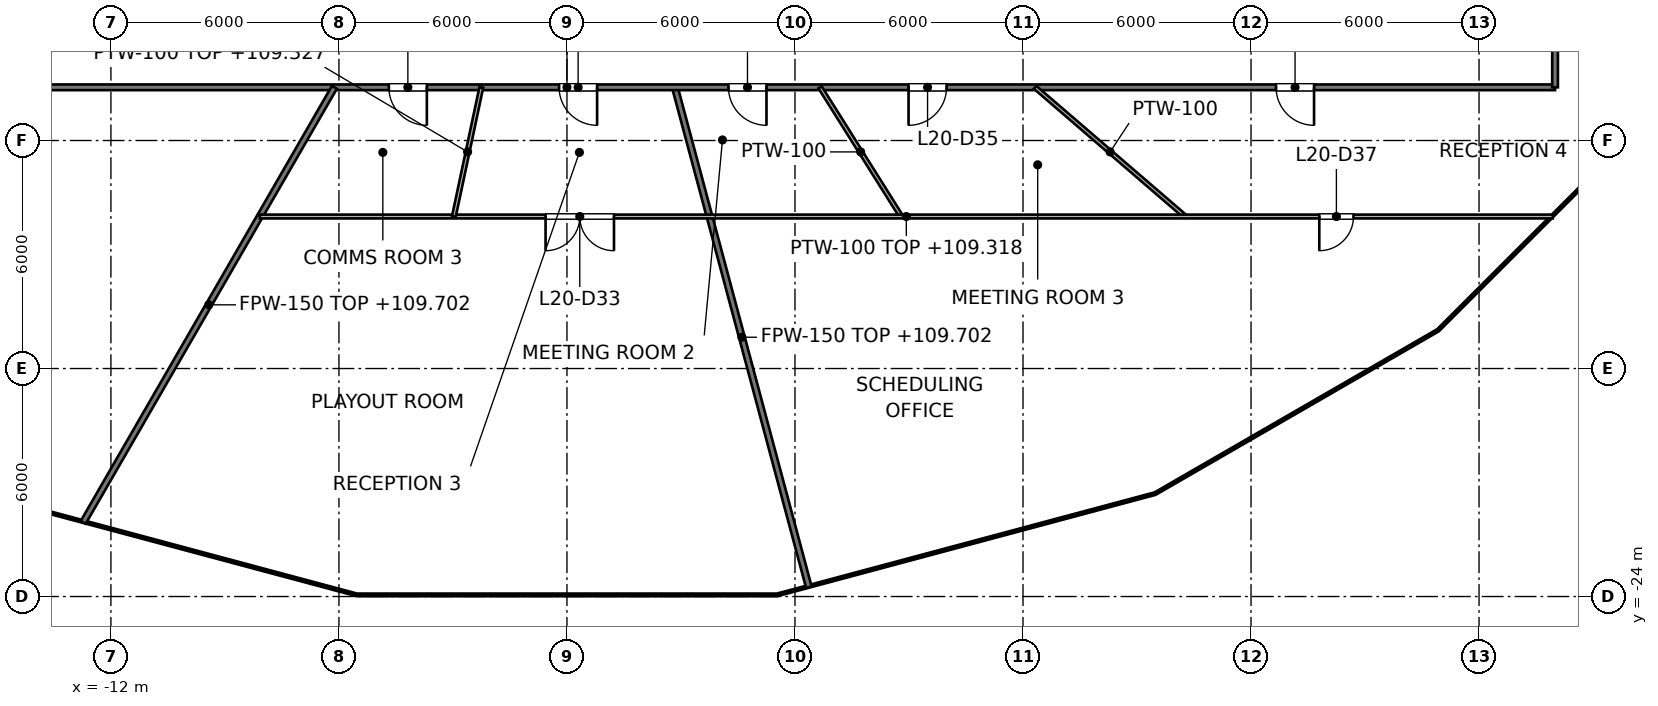
"""IFC4 building model, lengths in metres.
Left out: names, types, materials, properties, quantities, classifications, styles, units other than length and angle.
Written with IfcOpenShell. Run it as: python <this file> out.ifc"""

import sys

from ifc_helpers import new_model, si_unit, direction, frame, frame_2d, origin, place, context, subcontext, project, spatial, rectangle, extrude, element, fill, save


model = new_model("IFC4")
c1 = context("Model", 3, precision=1e-05, world=origin(), true_north=direction((0.0, 1.0)))
c2 = subcontext(c1, "Body", "Model", "MODEL_VIEW")
j1 = project(units=[si_unit("LENGTHUNIT", "METRE"), si_unit("PLANEANGLEUNIT", "RADIAN")], contexts=[c1])
p1 = place(None, origin())
s1 = spatial("IfcSite", under=j1, at=p1, CompositionType="ELEMENT")
p2 = place(p1, origin())
s2 = spatial("IfcBuilding", under=s1, at=p2, CompositionType="ELEMENT")
p3 = place(p2, frame((0.0, 0.0, 106.2)))
s3 = spatial("IfcBuildingStorey", under=s2, at=p3, CompositionType="ELEMENT", Elevation=106.2)
p4 = place(p3, frame((2.84, -10.6, 0.0), z_axis=(0.0, 0.0, 1.0), x_axis=(0.258826294763, -0.965923883719, 0.0)))
e1 = element("IfcWall", 1, at=p4, inside=s3, PredefinedType="PARTITIONING", context=c2, shape_type="SweptSolid", body=[
    extrude(rectangle(XDim=13.618, YDim=0.15, at=frame_2d((6.809, 0.0))), origin(), (0.0, 0.0, 1.0), 3.502),
])
p5 = place(p3, frame((-26.0, -10.6, 0.0), z_axis=(0.0, 0.0, 1.0), x_axis=(1.0, 0.0, 0.0)))
e2 = element("IfcWall", 2, at=p5, inside=s3, PredefinedType="PARTITIONING", context=c2, shape_type="SweptSolid", body=[
    extrude(rectangle(XDim=52.0, YDim=0.15, at=frame_2d((26.0, 0.0))), origin(), (0.0, 0.0, 1.0), 3.118),
])
p6 = place(p5, frame((9.34, 0.0, 0.0)))
e3 = element("IfcOpeningElement", 3, at=p6, cuts=e2, PredefinedType="OPENING", context=c2, shape_type="SweptSolid", body=[
    extrude(rectangle(XDim=1.2, YDim=2.1, at=frame_2d((0.6, 1.05))), frame((0.0, 0.075, 0.0), z_axis=(0.0, -1.0, 0.0), x_axis=(1.0, 0.0, 0.0)), (0.0, 0.0, 1.0), 0.15),
])
p7 = place(p5, frame((21.313, 0.0, 0.0)))
e4 = element("IfcOpeningElement", 4, at=p7, cuts=e2, PredefinedType="OPENING", context=c2, shape_type="SweptSolid", body=[
    extrude(rectangle(XDim=1.0, YDim=2.1, at=frame_2d((0.5, 1.05))), frame((0.0, 0.075, 0.0), z_axis=(0.0, -1.0, 0.0), x_axis=(1.0, 0.0, 0.0)), (0.0, 0.0, 1.0), 0.15),
])
p8 = place(p5, frame((25.793, 0.0, 0.0)))
e5 = element("IfcOpeningElement", 5, at=p8, cuts=e2, PredefinedType="OPENING", context=c2, shape_type="SweptSolid", body=[
    extrude(rectangle(XDim=1.0, YDim=2.1, at=frame_2d((0.5, 1.05))), frame((0.0, 0.075, 0.0), z_axis=(0.0, -1.0, 0.0), x_axis=(1.0, 0.0, 0.0)), (0.0, 0.0, 1.0), 0.15),
])
p9 = place(p5, frame((30.25, 0.0, 0.0)))
e6 = element("IfcOpeningElement", 6, at=p9, cuts=e2, PredefinedType="OPENING", context=c2, shape_type="SweptSolid", body=[
    extrude(rectangle(XDim=1.0, YDim=2.1, at=frame_2d((0.5, 1.05))), frame((0.0, 0.075, 0.0), z_axis=(0.0, -1.0, 0.0), x_axis=(1.0, 0.0, 0.0)), (0.0, 0.0, 1.0), 0.15),
])
p10 = place(p5, frame((34.989, 0.0, 0.0)))
e7 = element("IfcOpeningElement", 7, at=p10, cuts=e2, PredefinedType="OPENING", context=c2, shape_type="SweptSolid", body=[
    extrude(rectangle(XDim=1.0, YDim=2.1, at=frame_2d((0.5, 1.05))), frame((0.0, 0.075, 0.0), z_axis=(0.0, -1.0, 0.0), x_axis=(1.0, 0.0, 0.0)), (0.0, 0.0, 1.0), 0.15),
])
p11 = place(p5, frame((44.658, 0.0, 0.0)))
e8 = element("IfcOpeningElement", 8, at=p11, cuts=e2, PredefinedType="OPENING", context=c2, shape_type="SweptSolid", body=[
    extrude(rectangle(XDim=1.0, YDim=2.1, at=frame_2d((0.5, 1.05))), frame((0.0, 0.075, 0.0), z_axis=(0.0, -1.0, 0.0), x_axis=(1.0, 0.0, 0.0)), (0.0, 0.0, 1.0), 0.15),
])
p12 = place(p3, frame((-12.729, -22.048, 0.0), z_axis=(0.0, 0.0, 1.0), x_axis=(0.499978786084, 0.866037651298, 0.0)))
e9 = element("IfcWall", 9, at=p12, inside=s3, PredefinedType="PARTITIONING", context=c2, shape_type="SweptSolid", body=[
    extrude(rectangle(XDim=13.219, YDim=0.15, at=frame_2d((6.609, 0.0))), origin(), (0.0, 0.0, 1.0), 3.502),
])
p13 = place(p3, frame((26.0, -10.6, 0.0), z_axis=(0.0, 0.0, 1.0), x_axis=(0.0, 1.0, 0.0)))
e10 = element("IfcWall", 10, at=p13, inside=s3, PredefinedType="PARTITIONING", context=c2, shape_type="SweptSolid", body=[
    extrude(rectangle(XDim=2.8, YDim=0.15, at=frame_2d((1.4, 0.0))), origin(), (0.0, 0.0, 1.0), 3.276),
])
p14 = place(p3, frame((6.66, -10.6, 0.0), z_axis=(0.0, 0.0, 1.0), x_axis=(0.532193956065, -0.846622461979, 0.0)))
e11 = element("IfcWall", 11, at=p14, inside=s3, PredefinedType="PARTITIONING", context=c2, shape_type="SweptSolid", body=[
    extrude(rectangle(XDim=4.016, YDim=0.1, at=frame_2d((2.008, 0.0))), origin(), (0.0, 0.0, 1.0), 4.05),
])
p15 = place(p3, frame((12.317, -10.6, 0.0), z_axis=(0.0, 0.0, 1.0), x_axis=(0.758005488553, -0.652248173109, 0.0)))
e12 = element("IfcWall", 12, at=p15, inside=s3, PredefinedType="PARTITIONING", context=c2, shape_type="SweptSolid", body=[
    extrude(rectangle(XDim=5.213, YDim=0.1, at=frame_2d((2.606, 0.0))), origin(), (0.0, 0.0, 1.0), 4.05),
])
p16 = place(p3, frame((-8.083, -14.0, 0.0), z_axis=(0.0, 0.0, 1.0), x_axis=(1.0, 0.0, 0.0)))
e13 = element("IfcWall", 13, at=p16, inside=s3, PredefinedType="PARTITIONING", context=c2, shape_type="SweptSolid", body=[
    extrude(rectangle(XDim=34.024, YDim=0.1, at=frame_2d((17.012, 0.0))), origin(), (0.0, 0.0, 1.0), 3.118),
])
p17 = place(p16, frame((7.52, 0.0, 0.0)))
e14 = element("IfcOpeningElement", 14, at=p17, cuts=e13, PredefinedType="OPENING", context=c2, shape_type="SweptSolid", body=[
    extrude(rectangle(XDim=1.8, YDim=2.1, at=frame_2d((0.9, 1.05))), frame((0.0, 0.05, 0.0), z_axis=(0.0, -1.0, 0.0), x_axis=(1.0, 0.0, 0.0)), (0.0, 0.0, 1.0), 0.1),
])
p18 = place(p16, frame((27.879, 0.0, 0.0)))
e15 = element("IfcOpeningElement", 15, at=p18, cuts=e13, PredefinedType="OPENING", context=c2, shape_type="SweptSolid", body=[
    extrude(rectangle(XDim=0.9, YDim=2.1, at=frame_2d((0.45, 1.05))), frame((0.0, 0.05, 0.0), z_axis=(0.0, -1.0, 0.0), x_axis=(1.0, 0.0, 0.0)), (0.0, 0.0, 1.0), 0.1),
])
p19 = place(p3, frame((-2.976, -14.0, 0.0), z_axis=(0.0, 0.0, 1.0), x_axis=(0.208041878594, 0.978119919412, 0.0)))
e16 = element("IfcWall", 16, at=p19, inside=s3, PredefinedType="PARTITIONING", context=c2, shape_type="SweptSolid", body=[
    extrude(rectangle(XDim=3.476, YDim=0.1, at=frame_2d((1.738, 0.0))), origin(), (0.0, 0.0, 1.0), 3.127),
])
p20 = place(p7, origin())
e17 = element("IfcDoor", 17, at=p20, inside=s3, OperationType="SINGLE_SWING_RIGHT", PredefinedType="DOOR", context=c2, shape_type="SweptSolid", body=[
    extrude(rectangle(XDim=1.0, YDim=2.1, at=frame_2d((0.5, 1.05))), frame((0.0, 0.025, 0.0), z_axis=(0.0, -1.0, 0.0), x_axis=(1.0, 0.0, 0.0)), (0.0, 0.0, 1.0), 0.05),
])
fill(e4, e17)
p21 = place(p8, origin())
e18 = element("IfcDoor", 18, at=p21, inside=s3, OperationType="SINGLE_SWING_RIGHT", PredefinedType="DOOR", context=c2, shape_type="SweptSolid", body=[
    extrude(rectangle(XDim=1.0, YDim=2.1, at=frame_2d((0.5, 1.05))), frame((0.0, 0.025, 0.0), z_axis=(0.0, -1.0, 0.0), x_axis=(1.0, 0.0, 0.0)), (0.0, 0.0, 1.0), 0.05),
])
fill(e5, e18)
p22 = place(p17, origin())
e19 = element("IfcDoor", 19, at=p22, inside=s3, OperationType="DOUBLE_DOOR_SINGLE_SWING", PredefinedType="DOOR", context=c2, shape_type="SweptSolid", body=[
    extrude(rectangle(XDim=1.8, YDim=2.1, at=frame_2d((0.9, 1.05))), frame((0.0, 0.025, 0.0), z_axis=(0.0, -1.0, 0.0), x_axis=(1.0, 0.0, 0.0)), (0.0, 0.0, 1.0), 0.05),
])
fill(e14, e19)
p23 = place(p9, origin())
e20 = element("IfcDoor", 20, at=p23, inside=s3, OperationType="SINGLE_SWING_RIGHT", PredefinedType="DOOR", context=c2, shape_type="SweptSolid", body=[
    extrude(rectangle(XDim=1.0, YDim=2.1, at=frame_2d((0.5, 1.05))), frame((0.0, 0.025, 0.0), z_axis=(0.0, -1.0, 0.0), x_axis=(1.0, 0.0, 0.0)), (0.0, 0.0, 1.0), 0.05),
])
fill(e6, e20)
p24 = place(p10, origin())
e21 = element("IfcDoor", 21, at=p24, inside=s3, OperationType="SINGLE_SWING_LEFT", PredefinedType="DOOR", context=c2, shape_type="SweptSolid", body=[
    extrude(rectangle(XDim=1.0, YDim=2.1, at=frame_2d((0.5, 1.05))), frame((0.0, 0.025, 0.0), z_axis=(0.0, -1.0, 0.0), x_axis=(1.0, 0.0, 0.0)), (0.0, 0.0, 1.0), 0.05),
])
fill(e7, e21)
p25 = place(p11, origin())
e22 = element("IfcDoor", 22, at=p25, inside=s3, OperationType="SINGLE_SWING_RIGHT", PredefinedType="DOOR", context=c2, shape_type="SweptSolid", body=[
    extrude(rectangle(XDim=1.0, YDim=2.1, at=frame_2d((0.5, 1.05))), frame((0.0, 0.025, 0.0), z_axis=(0.0, -1.0, 0.0), x_axis=(1.0, 0.0, 0.0)), (0.0, 0.0, 1.0), 0.05),
])
fill(e8, e22)
p26 = place(p18, origin())
e23 = element("IfcDoor", 23, at=p26, inside=s3, OperationType="SINGLE_SWING_LEFT", PredefinedType="DOOR", context=c2, shape_type="SweptSolid", body=[
    extrude(rectangle(XDim=0.9, YDim=2.1, at=frame_2d((0.45, 1.05))), frame((0.0, 0.025, 0.0), z_axis=(0.0, -1.0, 0.0), x_axis=(1.0, 0.0, 0.0)), (0.0, 0.0, 1.0), 0.05),
])
fill(e15, e23)
save(model, sys.argv[1])
